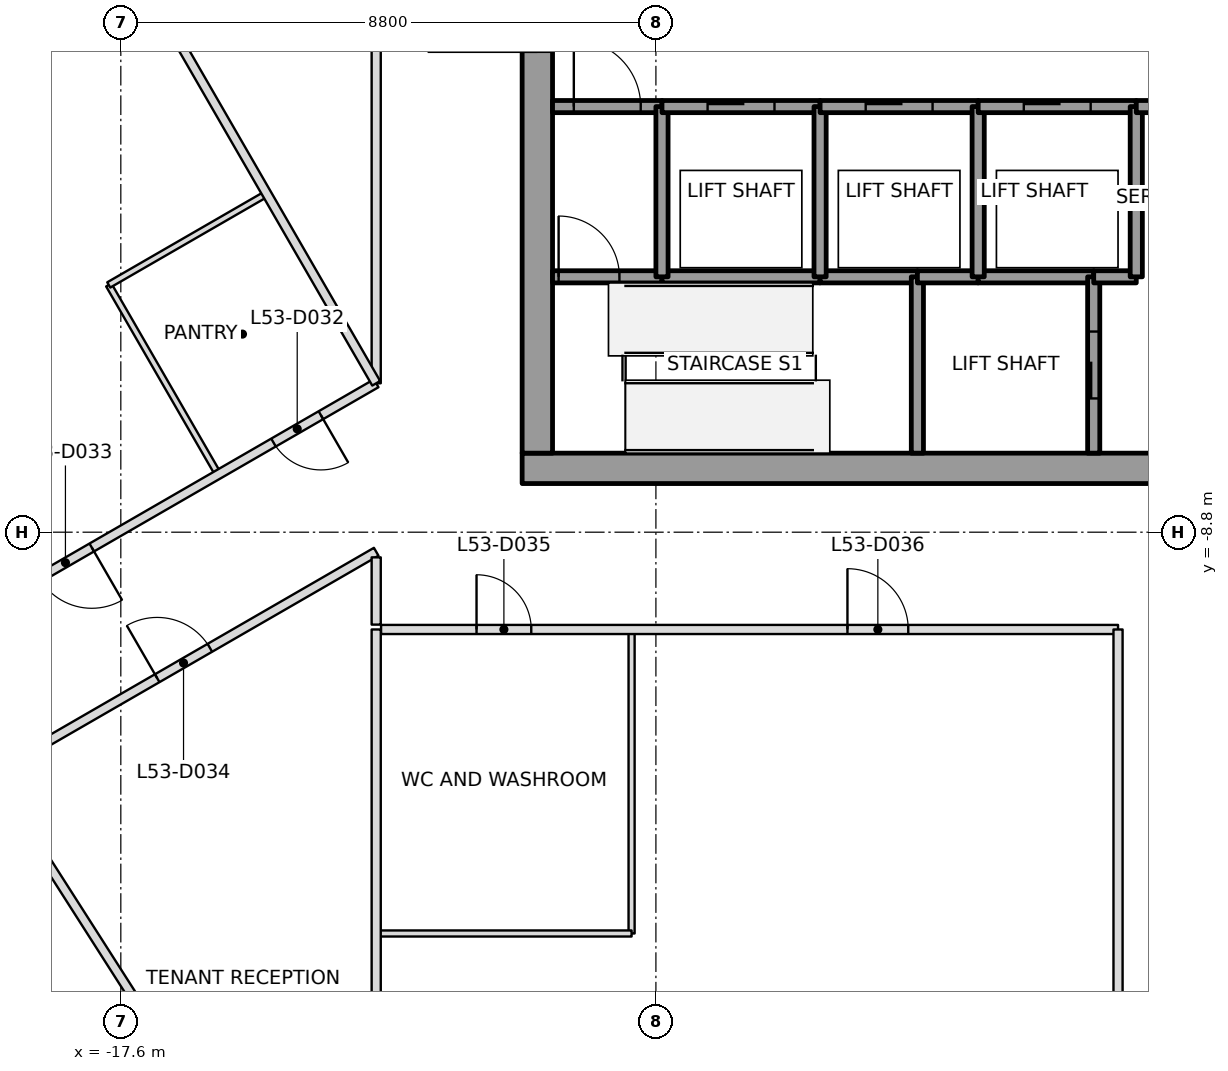
"""IFC4 building model, lengths in metres.
Left out: names, types, materials, properties, quantities, classifications, styles, units other than length and angle.
Written with IfcOpenShell. Run it as: python <this file> out.ifc"""

import sys

from ifc_helpers import new_model, si_unit, direction, frame, frame_2d, origin, place, context, subcontext, project, spatial, rectangle, extrude, element, fill, save


model = new_model("IFC4")
c1 = context("Model", 3, precision=1e-05, world=origin(), true_north=direction((0.0, 1.0)))
c2 = subcontext(c1, "Body", "Model", "MODEL_VIEW")
j1 = project(units=[si_unit("LENGTHUNIT", "METRE"), si_unit("PLANEANGLEUNIT", "RADIAN")], contexts=[c1])
p1 = place(None, origin())
s1 = spatial("IfcSite", under=j1, at=p1, CompositionType="ELEMENT")
p2 = place(p1, origin())
s2 = spatial("IfcBuilding", under=s1, at=p2, CompositionType="ELEMENT")
p3 = place(p2, frame((0.0, 0.0, 239.0)))
s3 = spatial("IfcBuildingStorey", under=s2, at=p3, CompositionType="ELEMENT", Elevation=239.0)
p4 = place(p3, frame((-11.0, -7.75, 0.0), z_axis=(0.0, 0.0, 1.0), x_axis=(1.0, 0.0, 0.0)))
e1 = element("IfcWall", 1, at=p4, inside=s3, PredefinedType="SHEAR", context=c2, shape_type="SweptSolid", body=[
    extrude(rectangle(XDim=22.0, YDim=0.5, at=frame_2d((11.0, 0.0))), origin(), (0.0, 0.0, 1.0), 4.0),
])
p5 = place(p4, frame((10.45, 0.0, 0.0)))
e2 = element("IfcOpeningElement", 2, at=p5, cuts=e1, PredefinedType="OPENING", context=c2, shape_type="SweptSolid", body=[
    extrude(rectangle(XDim=1.1, YDim=2.1, at=frame_2d((0.55, 1.05))), frame((0.0, 0.25, 0.0), z_axis=(0.0, -1.0, 0.0), x_axis=(1.0, 0.0, 0.0)), (0.0, 0.0, 1.0), 0.5),
])
p6 = place(p3, frame((-10.75, -7.5, 0.0), z_axis=(0.0, 0.0, 1.0), x_axis=(0.0, 1.0, 0.0)))
e3 = element("IfcWall", 3, at=p6, inside=s3, PredefinedType="SHEAR", context=c2, shape_type="SweptSolid", body=[
    extrude(rectangle(XDim=15.0, YDim=0.5, at=frame_2d((7.5, 0.0))), origin(), (0.0, 0.0, 1.0), 4.0),
])
p7 = place(p6, frame((6.6, 0.0, 0.0)))
e4 = element("IfcOpeningElement", 4, at=p7, cuts=e3, PredefinedType="OPENING", context=c2, shape_type="SweptSolid", body=[
    extrude(rectangle(XDim=1.8, YDim=2.1, at=frame_2d((0.9, 1.05))), frame((0.0, 0.25, 0.0), z_axis=(0.0, -1.0, 0.0), x_axis=(1.0, 0.0, 0.0)), (0.0, 0.0, 1.0), 0.5),
])
p8 = place(p3, frame((-10.5, -4.6, 0.0), z_axis=(0.0, 0.0, 1.0), x_axis=(1.0, 0.0, 0.0)))
e5 = element("IfcWall", 5, at=p8, inside=s3, PredefinedType="SOLIDWALL", context=c2, shape_type="SweptSolid", body=[
    extrude(rectangle(XDim=1.8, YDim=0.2, at=frame_2d((0.9, 0.0))), origin(), (0.0, 0.0, 1.0), 3.85),
])
p9 = place(p8, frame((0.1, 0.0, 0.0)))
e6 = element("IfcOpeningElement", 6, at=p9, cuts=e5, PredefinedType="OPENING", context=c2, shape_type="SweptSolid", body=[
    extrude(rectangle(XDim=1.0, YDim=2.1, at=frame_2d((0.5, 1.05))), frame((0.0, 0.1, 0.0), z_axis=(0.0, -1.0, 0.0), x_axis=(1.0, 0.0, 0.0)), (0.0, 0.0, 1.0), 0.2),
])
p10 = place(p3, frame((-10.5, -1.8, 0.0), z_axis=(0.0, 0.0, 1.0), x_axis=(1.0, 0.0, 0.0)))
e7 = element("IfcWall", 7, at=p10, inside=s3, PredefinedType="SOLIDWALL", context=c2, shape_type="SweptSolid", body=[
    extrude(rectangle(XDim=1.8, YDim=0.2, at=frame_2d((0.9, 0.0))), origin(), (0.0, 0.0, 1.0), 3.85),
])
p11 = place(p10, frame((0.35, 0.0, 0.0)))
e8 = element("IfcOpeningElement", 8, at=p11, cuts=e7, PredefinedType="OPENING", context=c2, shape_type="SweptSolid", body=[
    extrude(rectangle(XDim=1.1, YDim=2.1, at=frame_2d((0.55, 1.05))), frame((0.0, 0.1, 0.0), z_axis=(0.0, -1.0, 0.0), x_axis=(1.0, 0.0, 0.0)), (0.0, 0.0, 1.0), 0.2),
])
p12 = place(p3, frame((-8.7, -4.6, 0.0), z_axis=(0.0, 0.0, 1.0), x_axis=(1.0, 0.0, 0.0)))
e9 = element("IfcWall", 9, at=p12, inside=s3, PredefinedType="SOLIDWALL", context=c2, shape_type="SweptSolid", body=[
    extrude(rectangle(XDim=2.6, YDim=0.2, at=frame_2d((1.3, 0.0))), origin(), (0.0, 0.0, 1.0), 3.85),
])
p13 = place(p3, frame((-8.7, -4.6, 0.0), z_axis=(0.0, 0.0, 1.0), x_axis=(0.0, 1.0, 0.0)))
e10 = element("IfcWall", 10, at=p13, inside=s3, PredefinedType="SOLIDWALL", context=c2, shape_type="SweptSolid", body=[
    extrude(rectangle(XDim=2.8, YDim=0.2, at=frame_2d((1.4, 0.0))), origin(), (0.0, 0.0, 1.0), 3.85),
])
p14 = place(p3, frame((-8.7, -1.8, 0.0), z_axis=(0.0, 0.0, 1.0), x_axis=(1.0, 0.0, 0.0)))
e11 = element("IfcWall", 11, at=p14, inside=s3, PredefinedType="SOLIDWALL", context=c2, shape_type="SweptSolid", body=[
    extrude(rectangle(XDim=2.6, YDim=0.2, at=frame_2d((1.3, 0.0))), origin(), (0.0, 0.0, 1.0), 3.85),
])
p15 = place(p14, frame((0.75, 0.0, 0.0)))
e12 = element("IfcOpeningElement", 12, at=p15, cuts=e11, PredefinedType="OPENING", context=c2, shape_type="SweptSolid", body=[
    extrude(rectangle(XDim=1.1, YDim=2.1, at=frame_2d((0.55, 1.05))), frame((0.0, 0.1, 0.0), z_axis=(0.0, -1.0, 0.0), x_axis=(1.0, 0.0, 0.0)), (0.0, 0.0, 1.0), 0.2),
])
p16 = place(p3, frame((-6.1, -4.6, 0.0), z_axis=(0.0, 0.0, 1.0), x_axis=(1.0, 0.0, 0.0)))
e13 = element("IfcWall", 13, at=p16, inside=s3, PredefinedType="SOLIDWALL", context=c2, shape_type="SweptSolid", body=[
    extrude(rectangle(XDim=1.6, YDim=0.2, at=frame_2d((0.8, 0.0))), origin(), (0.0, 0.0, 1.0), 3.85),
])
p17 = place(p3, frame((-6.1, -4.6, 0.0), z_axis=(0.0, 0.0, 1.0), x_axis=(0.0, 1.0, 0.0)))
e14 = element("IfcWall", 14, at=p17, inside=s3, PredefinedType="SOLIDWALL", context=c2, shape_type="SweptSolid", body=[
    extrude(rectangle(XDim=2.8, YDim=0.2, at=frame_2d((1.4, 0.0))), origin(), (0.0, 0.0, 1.0), 3.85),
])
p18 = place(p3, frame((-6.1, -1.8, 0.0), z_axis=(0.0, 0.0, 1.0), x_axis=(1.0, 0.0, 0.0)))
e15 = element("IfcWall", 15, at=p18, inside=s3, PredefinedType="SOLIDWALL", context=c2, shape_type="SweptSolid", body=[
    extrude(rectangle(XDim=2.6, YDim=0.2, at=frame_2d((1.3, 0.0))), origin(), (0.0, 0.0, 1.0), 3.85),
])
p19 = place(p18, frame((0.75, 0.0, 0.0)))
e16 = element("IfcOpeningElement", 16, at=p19, cuts=e15, PredefinedType="OPENING", context=c2, shape_type="SweptSolid", body=[
    extrude(rectangle(XDim=1.1, YDim=2.1, at=frame_2d((0.55, 1.05))), frame((0.0, 0.1, 0.0), z_axis=(0.0, -1.0, 0.0), x_axis=(1.0, 0.0, 0.0)), (0.0, 0.0, 1.0), 0.2),
])
p20 = place(p3, frame((-4.5, -4.6, 0.0), z_axis=(0.0, 0.0, 1.0), x_axis=(0.0, -1.0, 0.0)))
e17 = element("IfcWall", 17, at=p20, inside=s3, PredefinedType="SOLIDWALL", context=c2, shape_type="SweptSolid", body=[
    extrude(rectangle(XDim=2.9, YDim=0.2, at=frame_2d((1.45, 0.0))), origin(), (0.0, 0.0, 1.0), 3.85),
])
p21 = place(p3, frame((-4.5, -4.6, 0.0), z_axis=(0.0, 0.0, 1.0), x_axis=(1.0, 0.0, 0.0)))
e18 = element("IfcWall", 18, at=p21, inside=s3, PredefinedType="SOLIDWALL", context=c2, shape_type="SweptSolid", body=[
    extrude(rectangle(XDim=1.0, YDim=0.2, at=frame_2d((0.5, 0.0))), origin(), (0.0, 0.0, 1.0), 3.85),
])
p22 = place(p3, frame((-3.5, -4.6, 0.0), z_axis=(0.0, 0.0, 1.0), x_axis=(1.0, 0.0, 0.0)))
e19 = element("IfcWall", 19, at=p22, inside=s3, PredefinedType="SOLIDWALL", context=c2, shape_type="SweptSolid", body=[
    extrude(rectangle(XDim=1.9, YDim=0.2, at=frame_2d((0.95, 0.0))), origin(), (0.0, 0.0, 1.0), 3.85),
])
p23 = place(p3, frame((-3.5, -4.6, 0.0), z_axis=(0.0, 0.0, 1.0), x_axis=(0.0, 1.0, 0.0)))
e20 = element("IfcWall", 20, at=p23, inside=s3, PredefinedType="SOLIDWALL", context=c2, shape_type="SweptSolid", body=[
    extrude(rectangle(XDim=2.8, YDim=0.2, at=frame_2d((1.4, 0.0))), origin(), (0.0, 0.0, 1.0), 3.85),
])
p24 = place(p3, frame((-3.5, -1.8, 0.0), z_axis=(0.0, 0.0, 1.0), x_axis=(1.0, 0.0, 0.0)))
e21 = element("IfcWall", 21, at=p24, inside=s3, PredefinedType="SOLIDWALL", context=c2, shape_type="SweptSolid", body=[
    extrude(rectangle(XDim=2.6, YDim=0.2, at=frame_2d((1.3, 0.0))), origin(), (0.0, 0.0, 1.0), 3.85),
])
p25 = place(p24, frame((0.75, 0.0, 0.0)))
e22 = element("IfcOpeningElement", 22, at=p25, cuts=e21, PredefinedType="OPENING", context=c2, shape_type="SweptSolid", body=[
    extrude(rectangle(XDim=1.1, YDim=2.1, at=frame_2d((0.55, 1.05))), frame((0.0, 0.1, 0.0), z_axis=(0.0, -1.0, 0.0), x_axis=(1.0, 0.0, 0.0)), (0.0, 0.0, 1.0), 0.2),
])
p26 = place(p3, frame((-1.6, -7.5, 0.0), z_axis=(0.0, 0.0, 1.0), x_axis=(0.0, 1.0, 0.0)))
e23 = element("IfcWall", 23, at=p26, inside=s3, PredefinedType="SOLIDWALL", context=c2, shape_type="SweptSolid", body=[
    extrude(rectangle(XDim=2.9, YDim=0.2, at=frame_2d((1.45, 0.0))), origin(), (0.0, 0.0, 1.0), 3.85),
])
p27 = place(p26, frame((0.9, 0.0, 0.0)))
e24 = element("IfcOpeningElement", 24, at=p27, cuts=e23, PredefinedType="OPENING", context=c2, shape_type="SweptSolid", body=[
    extrude(rectangle(XDim=1.1, YDim=2.1, at=frame_2d((0.55, 1.05))), frame((0.0, 0.1, 0.0), z_axis=(0.0, -1.0, 0.0), x_axis=(1.0, 0.0, 0.0)), (0.0, 0.0, 1.0), 0.2),
])
p28 = place(p3, frame((-1.6, -4.6, 0.0), z_axis=(0.0, 0.0, 1.0), x_axis=(1.0, 0.0, 0.0)))
e25 = element("IfcWall", 25, at=p28, inside=s3, PredefinedType="SOLIDWALL", context=c2, shape_type="SweptSolid", body=[
    extrude(rectangle(XDim=0.7, YDim=0.2, at=frame_2d((0.35, 0.0))), origin(), (0.0, 0.0, 1.0), 3.85),
])
p29 = place(p3, frame((-0.9, -4.6, 0.0), z_axis=(0.0, 0.0, 1.0), x_axis=(0.0, 1.0, 0.0)))
e26 = element("IfcWall", 26, at=p29, inside=s3, PredefinedType="SOLIDWALL", context=c2, shape_type="SweptSolid", body=[
    extrude(rectangle(XDim=2.8, YDim=0.2, at=frame_2d((1.4, 0.0))), origin(), (0.0, 0.0, 1.0), 3.85),
])
p30 = place(p3, frame((-0.9, -1.8, 0.0), z_axis=(0.0, 0.0, 1.0), x_axis=(1.0, 0.0, 0.0)))
e27 = element("IfcWall", 27, at=p30, inside=s3, PredefinedType="SOLIDWALL", context=c2, shape_type="SweptSolid", body=[
    extrude(rectangle(XDim=1.8, YDim=0.2, at=frame_2d((0.9, 0.0))), origin(), (0.0, 0.0, 1.0), 3.85),
])
p31 = place(p30, frame((0.35, 0.0, 0.0)))
e28 = element("IfcOpeningElement", 28, at=p31, cuts=e27, PredefinedType="OPENING", context=c2, shape_type="SweptSolid", body=[
    extrude(rectangle(XDim=1.1, YDim=2.1, at=frame_2d((0.55, 1.05))), frame((0.0, 0.1, 0.0), z_axis=(0.0, -1.0, 0.0), x_axis=(1.0, 0.0, 0.0)), (0.0, 0.0, 1.0), 0.2),
])
p32 = place(p3, frame((-13.4, -6.351, 0.0), z_axis=(0.0, 0.0, 1.0), x_axis=(-0.500006471202, 0.866021667602, 0.0)))
e29 = element("IfcWall", 29, at=p32, inside=s3, PredefinedType="PARTITIONING", context=c2, shape_type="SweptSolid", body=[
    extrude(rectangle(XDim=14.658, YDim=0.15, at=frame_2d((7.329, 0.0))), origin(), (0.0, 0.0, 1.0), 3.234),
])
p33 = place(p3, frame((-19.737, -12.781, 0.0), z_axis=(0.0, 0.0, 1.0), x_axis=(0.538422993962, -0.842674717535, 0.0)))
e30 = element("IfcWall", 30, at=p33, inside=s3, PredefinedType="PARTITIONING", context=c2, shape_type="SweptSolid", body=[
    extrude(rectangle(XDim=8.57, YDim=0.15, at=frame_2d((4.285, 0.0))), origin(), (0.0, 0.0, 1.0), 3.3),
])
p34 = place(p3, frame((-13.4, -10.4, 0.0), z_axis=(0.0, 0.0, 1.0), x_axis=(0.0, -1.0, 0.0)))
e31 = element("IfcWall", 31, at=p34, inside=s3, PredefinedType="PARTITIONING", context=c2, shape_type="SweptSolid", body=[
    extrude(rectangle(XDim=10.045, YDim=0.15, at=frame_2d((5.022, 0.0))), origin(), (0.0, 0.0, 1.0), 3.084),
])
p35 = place(p3, frame((-13.4, -6.351, 0.0), z_axis=(0.0, 0.0, 1.0), x_axis=(-0.866032359495, -0.499987952162, 0.0)))
e32 = element("IfcWall", 32, at=p35, inside=s3, PredefinedType="PARTITIONING", context=c2, shape_type="SweptSolid", body=[
    extrude(rectangle(XDim=8.623, YDim=0.15, at=frame_2d((4.312, 0.0))), origin(), (0.0, 0.0, 1.0), 3.3),
])
p36 = place(p35, frame((1.05, 0.0, 0.0)))
e33 = element("IfcOpeningElement", 33, at=p36, cuts=e32, PredefinedType="OPENING", context=c2, shape_type="SweptSolid", body=[
    extrude(rectangle(XDim=0.9, YDim=2.1, at=frame_2d((0.45, 1.05))), frame((0.0, 0.075, 0.0), z_axis=(0.0, -1.0, 0.0), x_axis=(1.0, 0.0, 0.0)), (0.0, 0.0, 1.0), 0.15),
])
p37 = place(p35, frame((5.402, 0.0, 0.0)))
e34 = element("IfcOpeningElement", 34, at=p37, cuts=e32, PredefinedType="OPENING", context=c2, shape_type="SweptSolid", body=[
    extrude(rectangle(XDim=1.0, YDim=2.1, at=frame_2d((0.5, 1.05))), frame((0.0, 0.075, 0.0), z_axis=(0.0, -1.0, 0.0), x_axis=(1.0, 0.0, 0.0)), (0.0, 0.0, 1.0), 0.15),
])
p38 = place(p3, frame((-19.668, -12.741, 0.0), z_axis=(0.0, 0.0, 1.0), x_axis=(0.866023808947, 0.500002762329, 0.0)))
e35 = element("IfcWall", 35, at=p38, inside=s3, PredefinedType="PARTITIONING", context=c2, shape_type="SweptSolid", body=[
    extrude(rectangle(XDim=7.238, YDim=0.15, at=frame_2d((3.619, 0.0))), origin(), (0.0, 0.0, 1.0), 3.233),
])
p39 = place(p38, frame((3.079, 0.0, 0.0)))
e36 = element("IfcOpeningElement", 36, at=p39, cuts=e35, PredefinedType="OPENING", context=c2, shape_type="SweptSolid", body=[
    extrude(rectangle(XDim=1.0, YDim=2.1, at=frame_2d((0.5, 1.05))), frame((0.0, 0.075, 0.0), z_axis=(0.0, -1.0, 0.0), x_axis=(1.0, 0.0, 0.0)), (0.0, 0.0, 1.0), 0.15),
])
p40 = place(p3, frame((-13.4, -9.214, 0.0), z_axis=(0.0, 0.0, 1.0), x_axis=(0.0, -1.0, 0.0)))
e37 = element("IfcWall", 37, at=p40, inside=s3, PredefinedType="PARTITIONING", context=c2, shape_type="SweptSolid", body=[
    extrude(rectangle(XDim=1.106, YDim=0.15, at=frame_2d((0.553, 0.0))), origin(), (0.0, 0.0, 1.0), 3.233),
])
p41 = place(p3, frame((-13.4, 6.351, 0.0), z_axis=(0.0, 0.0, 1.0), x_axis=(0.0, -1.0, 0.0)))
e38 = element("IfcWall", 38, at=p41, inside=s3, PredefinedType="PARTITIONING", context=c2, shape_type="SweptSolid", body=[
    extrude(rectangle(XDim=12.702, YDim=0.15, at=frame_2d((6.351, 0.0))), origin(), (0.0, 0.0, 1.0), 3.3),
])
p42 = place(p41, frame((5.851, 0.0, 0.0)))
e39 = element("IfcOpeningElement", 39, at=p42, cuts=e38, PredefinedType="OPENING", context=c2, shape_type="SweptSolid", body=[
    extrude(rectangle(XDim=1.0, YDim=2.1, at=frame_2d((0.5, 1.05))), frame((0.0, 0.075, 0.0), z_axis=(0.0, -1.0, 0.0), x_axis=(1.0, 0.0, 0.0)), (0.0, 0.0, 1.0), 0.15),
])
p43 = place(p3, frame((-13.32, -10.4, 0.0), z_axis=(0.0, 0.0, 1.0), x_axis=(1.0, 0.0, 0.0)))
e40 = element("IfcWall", 40, at=p43, inside=s3, PredefinedType="PARTITIONING", context=c2, shape_type="SweptSolid", body=[
    extrude(rectangle(XDim=12.12, YDim=0.15, at=frame_2d((6.06, 0.0))), origin(), (0.0, 0.0, 1.0), 3.167),
])
p44 = place(p43, frame((1.57, 0.0, 0.0)))
e41 = element("IfcOpeningElement", 41, at=p44, cuts=e40, PredefinedType="OPENING", context=c2, shape_type="SweptSolid", body=[
    extrude(rectangle(XDim=0.9, YDim=2.1, at=frame_2d((0.45, 1.05))), frame((0.0, 0.075, 0.0), z_axis=(0.0, -1.0, 0.0), x_axis=(1.0, 0.0, 0.0)), (0.0, 0.0, 1.0), 0.15),
])
p45 = place(p43, frame((7.67, 0.0, 0.0)))
e42 = element("IfcOpeningElement", 42, at=p45, cuts=e40, PredefinedType="OPENING", context=c2, shape_type="SweptSolid", body=[
    extrude(rectangle(XDim=1.0, YDim=2.1, at=frame_2d((0.5, 1.05))), frame((0.0, 0.075, 0.0), z_axis=(0.0, -1.0, 0.0), x_axis=(1.0, 0.0, 0.0)), (0.0, 0.0, 1.0), 0.15),
])
p46 = place(p3, frame((-1.2, -10.4, 0.0), z_axis=(0.0, 0.0, 1.0), x_axis=(0.0, -1.0, 0.0)))
e43 = element("IfcWall", 43, at=p46, inside=s3, PredefinedType="PARTITIONING", context=c2, shape_type="SweptSolid", body=[
    extrude(rectangle(XDim=9.092, YDim=0.15, at=frame_2d((4.546, 0.0))), origin(), (0.0, 0.0, 1.0), 3.3),
])
p47 = place(p3, frame((-16.013, -7.825, 0.0), z_axis=(0.0, 0.0, 1.0), x_axis=(-0.499971082179, 0.866042098853, 0.0)))
e44 = element("IfcWall", 44, at=p47, inside=s3, PredefinedType="PARTITIONING", context=c2, shape_type="SweptSolid", body=[
    extrude(rectangle(XDim=3.57, YDim=0.1, at=frame_2d((1.785, 0.0))), origin(), (0.0, 0.0, 1.0), 3.3),
])
p48 = place(p3, frame((-17.798, -4.733, 0.0), z_axis=(0.0, 0.0, 1.0), x_axis=(0.866039111053, 0.499976257563, 0.0)))
e45 = element("IfcWall", 45, at=p48, inside=s3, PredefinedType="PARTITIONING", context=c2, shape_type="SweptSolid", body=[
    extrude(rectangle(XDim=2.97, YDim=0.1, at=frame_2d((1.485, 0.0))), origin(), (0.0, 0.0, 1.0), 3.3),
])
p49 = place(p3, frame((-9.2, -10.43, 0.0), z_axis=(0.0, 0.0, 1.0), x_axis=(0.0, -1.0, 0.0)))
e46 = element("IfcWall", 46, at=p49, inside=s3, PredefinedType="PARTITIONING", context=c2, shape_type="SweptSolid", body=[
    extrude(rectangle(XDim=4.97, YDim=0.1, at=frame_2d((2.485, 0.0))), origin(), (0.0, 0.0, 1.0), 3.3),
])
p50 = place(p3, frame((-9.2, -15.4, 0.0), z_axis=(0.0, 0.0, 1.0), x_axis=(-1.0, 0.0, 0.0)))
e47 = element("IfcWall", 47, at=p50, inside=s3, PredefinedType="PARTITIONING", context=c2, shape_type="SweptSolid", body=[
    extrude(rectangle(XDim=4.17, YDim=0.1, at=frame_2d((2.085, 0.0))), origin(), (0.0, 0.0, 1.0), 3.243),
])
p51 = place(p36, origin())
e48 = element("IfcDoor", 48, at=p51, inside=s3, OperationType="SINGLE_SWING_LEFT", PredefinedType="DOOR", context=c2, shape_type="SweptSolid", body=[
    extrude(rectangle(XDim=0.9, YDim=2.1, at=frame_2d((0.45, 1.05))), frame((0.0, 0.025, 0.0), z_axis=(0.0, -1.0, 0.0), x_axis=(1.0, 0.0, 0.0)), (0.0, 0.0, 1.0), 0.05),
])
fill(e33, e48)
p52 = place(p37, origin())
e49 = element("IfcDoor", 49, at=p52, inside=s3, OperationType="SINGLE_SWING_LEFT", PredefinedType="DOOR", context=c2, shape_type="SweptSolid", body=[
    extrude(rectangle(XDim=1.0, YDim=2.1, at=frame_2d((0.5, 1.05))), frame((0.0, 0.025, 0.0), z_axis=(0.0, -1.0, 0.0), x_axis=(1.0, 0.0, 0.0)), (0.0, 0.0, 1.0), 0.05),
])
fill(e34, e49)
p53 = place(p39, origin())
e50 = element("IfcDoor", 50, at=p53, inside=s3, OperationType="SINGLE_SWING_LEFT", PredefinedType="DOOR", context=c2, shape_type="SweptSolid", body=[
    extrude(rectangle(XDim=1.0, YDim=2.1, at=frame_2d((0.5, 1.05))), frame((0.0, 0.025, 0.0), z_axis=(0.0, -1.0, 0.0), x_axis=(1.0, 0.0, 0.0)), (0.0, 0.0, 1.0), 0.05),
])
fill(e36, e50)
p54 = place(p44, origin())
e51 = element("IfcDoor", 51, at=p54, inside=s3, OperationType="SINGLE_SWING_RIGHT", PredefinedType="DOOR", context=c2, shape_type="SweptSolid", body=[
    extrude(rectangle(XDim=0.9, YDim=2.1, at=frame_2d((0.45, 1.05))), frame((0.0, 0.025, 0.0), z_axis=(0.0, -1.0, 0.0), x_axis=(1.0, 0.0, 0.0)), (0.0, 0.0, 1.0), 0.05),
])
fill(e41, e51)
p55 = place(p45, origin())
e52 = element("IfcDoor", 52, at=p55, inside=s3, OperationType="SINGLE_SWING_LEFT", PredefinedType="DOOR", context=c2, shape_type="SweptSolid", body=[
    extrude(rectangle(XDim=1.0, YDim=2.1, at=frame_2d((0.5, 1.05))), frame((0.0, 0.025, 0.0), z_axis=(0.0, -1.0, 0.0), x_axis=(1.0, 0.0, 0.0)), (0.0, 0.0, 1.0), 0.05),
])
fill(e42, e52)
p56 = place(p15, origin())
e53 = element("IfcDoor", 53, at=p56, inside=s3, OperationType="SLIDING_TO_LEFT", PredefinedType="DOOR", context=c2, shape_type="SweptSolid", body=[
    extrude(rectangle(XDim=1.1, YDim=2.1, at=frame_2d((0.55, 1.05))), frame((0.0, 0.025, 0.0), z_axis=(0.0, -1.0, 0.0), x_axis=(1.0, 0.0, 0.0)), (0.0, 0.0, 1.0), 0.05),
])
fill(e12, e53)
p57 = place(p19, origin())
e54 = element("IfcDoor", 54, at=p57, inside=s3, OperationType="SLIDING_TO_LEFT", PredefinedType="DOOR", context=c2, shape_type="SweptSolid", body=[
    extrude(rectangle(XDim=1.1, YDim=2.1, at=frame_2d((0.55, 1.05))), frame((0.0, 0.025, 0.0), z_axis=(0.0, -1.0, 0.0), x_axis=(1.0, 0.0, 0.0)), (0.0, 0.0, 1.0), 0.05),
])
fill(e16, e54)
p58 = place(p25, origin())
e55 = element("IfcDoor", 55, at=p58, inside=s3, OperationType="SLIDING_TO_RIGHT", PredefinedType="DOOR", context=c2, shape_type="SweptSolid", body=[
    extrude(rectangle(XDim=1.1, YDim=2.1, at=frame_2d((0.55, 1.05))), frame((0.0, 0.025, 0.0), z_axis=(0.0, -1.0, 0.0), x_axis=(1.0, 0.0, 0.0)), (0.0, 0.0, 1.0), 0.05),
])
fill(e22, e55)
p59 = place(p27, origin())
e56 = element("IfcDoor", 56, at=p59, inside=s3, OperationType="SLIDING_TO_RIGHT", PredefinedType="DOOR", context=c2, shape_type="SweptSolid", body=[
    extrude(rectangle(XDim=1.1, YDim=2.1, at=frame_2d((0.55, 1.05))), frame((0.0, 0.025, 0.0), z_axis=(0.0, -1.0, 0.0), x_axis=(1.0, 0.0, 0.0)), (0.0, 0.0, 1.0), 0.05),
])
fill(e24, e56)
p60 = place(p11, origin())
e57 = element("IfcDoor", 57, at=p60, inside=s3, OperationType="SINGLE_SWING_RIGHT", PredefinedType="DOOR", context=c2, shape_type="SweptSolid", body=[
    extrude(rectangle(XDim=1.1, YDim=2.1, at=frame_2d((0.55, 1.05))), frame((0.0, 0.025, 0.0), z_axis=(0.0, -1.0, 0.0), x_axis=(1.0, 0.0, 0.0)), (0.0, 0.0, 1.0), 0.05),
])
fill(e8, e57)
p61 = place(p9, origin())
e58 = element("IfcDoor", 58, at=p61, inside=s3, OperationType="SINGLE_SWING_LEFT", PredefinedType="DOOR", context=c2, shape_type="SweptSolid", body=[
    extrude(rectangle(XDim=1.0, YDim=2.1, at=frame_2d((0.5, 1.05))), frame((0.0, 0.025, 0.0), z_axis=(0.0, -1.0, 0.0), x_axis=(1.0, 0.0, 0.0)), (0.0, 0.0, 1.0), 0.05),
])
fill(e6, e58)
p62 = place(p7, origin())
e59 = element("IfcDoor", 59, at=p62, inside=s3, OperationType="DOUBLE_DOOR_SINGLE_SWING", PredefinedType="DOOR", context=c2, shape_type="SweptSolid", body=[
    extrude(rectangle(XDim=1.8, YDim=2.1, at=frame_2d((0.9, 1.05))), frame((0.0, 0.025, 0.0), z_axis=(0.0, -1.0, 0.0), x_axis=(1.0, 0.0, 0.0)), (0.0, 0.0, 1.0), 0.05),
])
fill(e4, e59)
save(model, sys.argv[1])
